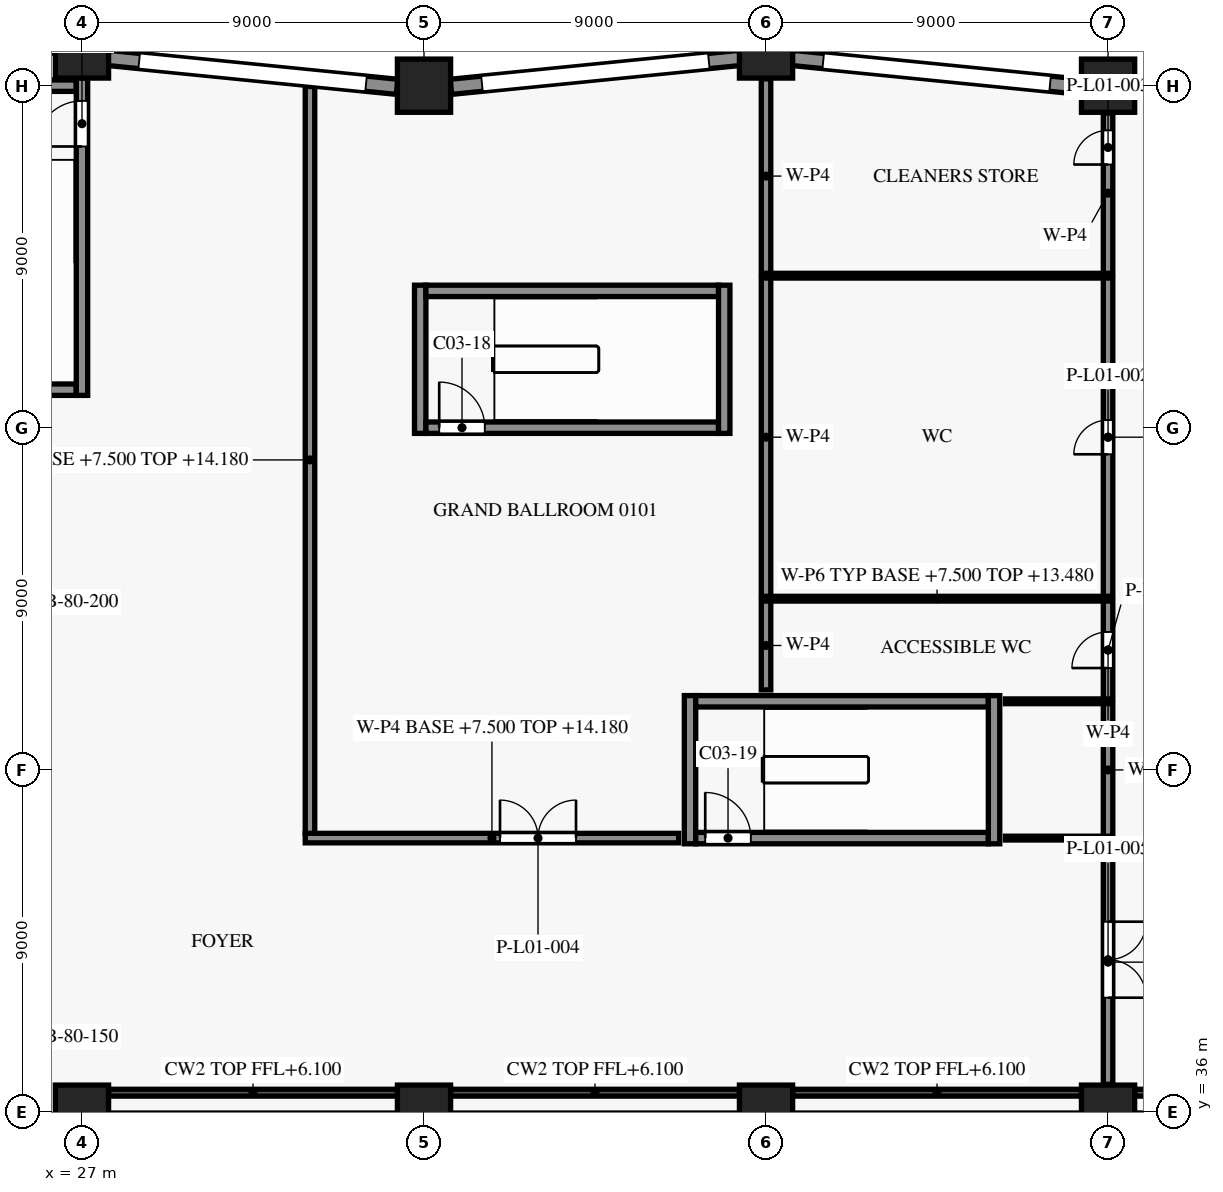
"""IFC4 building model, lengths in metres.
Left out: names, types, materials, properties, quantities, classifications, styles, units other than length and angle.
Written with IfcOpenShell. Run it as: python <this file> out.ifc"""

import sys

from ifc_helpers import new_model, si_unit, direction, frame, frame_2d, origin, origin_2d, place, context, subcontext, project, spatial, rectangle, extrude, element, fill, save


model = new_model("IFC4")
c1 = context("Model", 3, precision=1e-05, world=origin(), true_north=direction((0.0, 1.0)))
c2 = subcontext(c1, "Body", "Model", "MODEL_VIEW")
j1 = project(units=[si_unit("LENGTHUNIT", "METRE"), si_unit("PLANEANGLEUNIT", "RADIAN")], contexts=[c1])
p1 = place(None, origin())
s1 = spatial("IfcSite", under=j1, at=p1, CompositionType="ELEMENT")
p2 = place(p1, origin())
s2 = spatial("IfcBuilding", under=s1, at=p2, CompositionType="ELEMENT")
p3 = place(p2, frame((0.0, 0.0, 7.5)))
s3 = spatial("IfcBuildingStorey", under=s2, at=p3, CompositionType="ELEMENT", Elevation=7.5)
for number, where, z_axis, x_axis in (
    (1, (27.0, 36.0, 0.0), (0.0, 0.0, 1.0), (1.0, 0.0, 0.0)),
    (2, (36.0, 36.0, 0.0), (0.0, 0.0, 1.0), (1.0, 0.0, 0.0)),
    (3, (45.0, 36.0, 0.0), (0.0, 0.0, 1.0), (1.0, 0.0, 0.0)),
    (4, (54.0, 36.0, 0.0), (0.0, 0.0, 1.0), (1.0, 0.0, 0.0)),
    (5, (54.0, 63.0, 0.0), (0.0, 0.0, 1.0), (1.0, 0.0, 0.0)),
    (6, (45.0, 63.9, 0.0), (0.0, 0.0, 1.0), (1.0, 0.0, 0.0)),
    (7, (36.0, 63.0, 0.0), (0.0, 0.0, 1.0), (1.0, 0.0, 0.0)),
    (8, (27.0, 63.9, 0.0), (0.0, 0.0, 1.0), (1.0, 0.0, 0.0)),
):
    element("IfcColumn", number, at=place(p3, frame(where, z_axis=z_axis, x_axis=x_axis)), inside=s3, PredefinedType="COLUMN", context=c2, shape_type="SweptSolid", body=[
        extrude(rectangle(XDim=1.4, YDim=1.4, at=origin_2d()), origin(), (0.0, 0.0, 1.0), 7.0),
    ])
p4 = place(p3, frame((54.707, 62.97, 0.0), z_axis=(0.0, 0.0, 1.0), x_axis=(0.995039719416, 0.099478423711, 0.0)))
e9 = element("IfcWall", 9, at=p4, inside=s3, PredefinedType="SOLIDWALL", context=c2, shape_type="SweptSolid", body=[
    extrude(rectangle(XDim=7.645, YDim=0.4, at=frame_2d((3.822, 0.0))), origin(), (0.0, 0.0, 1.0), 6.1),
])
p5 = place(p4, frame((0.823, 0.0, 0.9)))
e10 = element("IfcOpeningElement", 10, at=p5, cuts=e9, PredefinedType="OPENING", context=c2, shape_type="SweptSolid", body=[
    extrude(rectangle(XDim=6.0, YDim=1.8, at=frame_2d((3.0, 0.9))), frame((0.0, 0.21, 0.0), z_axis=(0.0, -1.0, 0.0), x_axis=(1.0, 0.0, 0.0)), (0.0, 0.0, 1.0), 0.42),
])
p6 = place(p3, frame((45.687, 63.731, 0.0), z_axis=(0.0, 0.0, 1.0), x_axis=(0.995039719416, -0.099478423711, 0.0)))
e11 = element("IfcWall", 11, at=p6, inside=s3, PredefinedType="SOLIDWALL", context=c2, shape_type="SweptSolid", body=[
    extrude(rectangle(XDim=7.645, YDim=0.4, at=frame_2d((3.822, 0.0))), origin(), (0.0, 0.0, 1.0), 6.1),
])
p7 = place(p6, frame((0.823, 0.0, 0.9)))
e12 = element("IfcOpeningElement", 12, at=p7, cuts=e11, PredefinedType="OPENING", context=c2, shape_type="SweptSolid", body=[
    extrude(rectangle(XDim=6.0, YDim=1.8, at=frame_2d((3.0, 0.9))), frame((0.0, 0.21, 0.0), z_axis=(0.0, -1.0, 0.0), x_axis=(1.0, 0.0, 0.0)), (0.0, 0.0, 1.0), 0.42),
])
p8 = place(p3, frame((36.707, 62.97, 0.0), z_axis=(0.0, 0.0, 1.0), x_axis=(0.995039719416, 0.099478423711, 0.0)))
e13 = element("IfcWall", 13, at=p8, inside=s3, PredefinedType="SOLIDWALL", context=c2, shape_type="SweptSolid", body=[
    extrude(rectangle(XDim=7.645, YDim=0.4, at=frame_2d((3.822, 0.0))), origin(), (0.0, 0.0, 1.0), 6.1),
])
p9 = place(p8, frame((0.823, 0.0, 0.9)))
e14 = element("IfcOpeningElement", 14, at=p9, cuts=e13, PredefinedType="OPENING", context=c2, shape_type="SweptSolid", body=[
    extrude(rectangle(XDim=6.0, YDim=1.8, at=frame_2d((3.0, 0.9))), frame((0.0, 0.21, 0.0), z_axis=(0.0, -1.0, 0.0), x_axis=(1.0, 0.0, 0.0)), (0.0, 0.0, 1.0), 0.42),
])
p10 = place(p3, frame((27.687, 63.731, 0.0), z_axis=(0.0, 0.0, 1.0), x_axis=(0.995039719416, -0.099478423711, 0.0)))
e15 = element("IfcWall", 15, at=p10, inside=s3, PredefinedType="SOLIDWALL", context=c2, shape_type="SweptSolid", body=[
    extrude(rectangle(XDim=7.645, YDim=0.4, at=frame_2d((3.822, 0.0))), origin(), (0.0, 0.0, 1.0), 6.1),
])
p11 = place(p10, frame((0.823, 0.0, 0.9)))
e16 = element("IfcOpeningElement", 16, at=p11, cuts=e15, PredefinedType="OPENING", context=c2, shape_type="SweptSolid", body=[
    extrude(rectangle(XDim=6.0, YDim=1.8, at=frame_2d((3.0, 0.9))), frame((0.0, 0.21, 0.0), z_axis=(0.0, -1.0, 0.0), x_axis=(1.0, 0.0, 0.0)), (0.0, 0.0, 1.0), 0.42),
])
p12 = place(p3, frame((43.15, 43.2, 0.0), z_axis=(0.0, 0.0, 1.0), x_axis=(1.0, 0.0, 0.0)))
e17 = element("IfcWall", 17, at=p12, inside=s3, PredefinedType="SHEAR", context=c2, shape_type="SweptSolid", body=[
    extrude(rectangle(XDim=7.7, YDim=0.3, at=frame_2d((3.85, 0.0))), origin(), (0.0, 0.0, 1.0), 6.7),
])
p13 = place(p12, frame((0.25, 0.0, 0.0)))
e18 = element("IfcOpeningElement", 18, at=p13, cuts=e17, PredefinedType="OPENING", context=c2, shape_type="SweptSolid", body=[
    extrude(rectangle(XDim=1.2, YDim=2.2, at=frame_2d((0.6, 1.1))), frame((0.0, 0.16, 0.0), z_axis=(0.0, -1.0, 0.0), x_axis=(1.0, 0.0, 0.0)), (0.0, 0.0, 1.0), 0.32),
])
p14 = place(p3, frame((43.15, 46.8, 0.0), z_axis=(0.0, 0.0, 1.0), x_axis=(1.0, 0.0, 0.0)))
e19 = element("IfcWall", 19, at=p14, inside=s3, PredefinedType="SHEAR", context=c2, shape_type="SweptSolid", body=[
    extrude(rectangle(XDim=7.7, YDim=0.3, at=frame_2d((3.85, 0.0))), origin(), (0.0, 0.0, 1.0), 6.7),
])
p15 = place(p3, frame((36.05, 54.0, 0.0), z_axis=(0.0, 0.0, 1.0), x_axis=(1.0, 0.0, 0.0)))
e20 = element("IfcWall", 20, at=p15, inside=s3, PredefinedType="SHEAR", context=c2, shape_type="SweptSolid", body=[
    extrude(rectangle(XDim=7.7, YDim=0.3, at=frame_2d((3.85, 0.0))), origin(), (0.0, 0.0, 1.0), 6.7),
])
p16 = place(p15, frame((0.35, 0.0, 0.0)))
e21 = element("IfcOpeningElement", 21, at=p16, cuts=e20, PredefinedType="OPENING", context=c2, shape_type="SweptSolid", body=[
    extrude(rectangle(XDim=1.2, YDim=2.2, at=frame_2d((0.6, 1.1))), frame((0.0, 0.16, 0.0), z_axis=(0.0, -1.0, 0.0), x_axis=(1.0, 0.0, 0.0)), (0.0, 0.0, 1.0), 0.32),
])
p17 = place(p3, frame((23.4, 55.0, 0.0), z_axis=(0.0, 0.0, 1.0), x_axis=(1.0, 0.0, 0.0)))
e22 = element("IfcWall", 22, at=p17, inside=s3, PredefinedType="SHEAR", context=c2, shape_type="SweptSolid", body=[
    extrude(rectangle(XDim=3.45, YDim=0.3, at=frame_2d((1.725, 0.0))), origin(), (0.0, 0.0, 1.0), 6.7),
])
p18 = place(p3, frame((36.05, 57.6, 0.0), z_axis=(0.0, 0.0, 1.0), x_axis=(1.0, 0.0, 0.0)))
e23 = element("IfcWall", 23, at=p18, inside=s3, PredefinedType="SHEAR", context=c2, shape_type="SweptSolid", body=[
    extrude(rectangle(XDim=7.7, YDim=0.3, at=frame_2d((3.85, 0.0))), origin(), (0.0, 0.0, 1.0), 6.7),
])
p19 = place(p3, frame((23.55, 63.0, 0.0), z_axis=(0.0, 0.0, 1.0), x_axis=(1.0, 0.0, 0.0)))
e24 = element("IfcWall", 24, at=p19, inside=s3, PredefinedType="SHEAR", context=c2, shape_type="SweptSolid", body=[
    extrude(rectangle(XDim=3.3, YDim=0.3, at=frame_2d((1.65, 0.0))), origin(), (0.0, 0.0, 1.0), 6.7),
])
p20 = place(p3, frame((27.0, 54.85, 0.0), z_axis=(0.0, 0.0, 1.0), x_axis=(0.0, 1.0, 0.0)))
e25 = element("IfcWall", 25, at=p20, inside=s3, PredefinedType="SHEAR", context=c2, shape_type="SweptSolid", body=[
    extrude(rectangle(XDim=8.35, YDim=0.3, at=frame_2d((4.175, 0.0))), origin(), (0.0, 0.0, 1.0), 6.7),
])
p21 = place(p20, frame((6.55, 0.0, 0.0)))
e26 = element("IfcOpeningElement", 26, at=p21, cuts=e25, PredefinedType="OPENING", context=c2, shape_type="SweptSolid", body=[
    extrude(rectangle(XDim=1.2, YDim=2.2, at=frame_2d((0.6, 1.1))), frame((0.0, 0.16, 0.0), z_axis=(0.0, -1.0, 0.0), x_axis=(1.0, 0.0, 0.0)), (0.0, 0.0, 1.0), 0.32),
])
for number, where, z_axis, x_axis in (
    (27, (35.9, 53.85, 0.0), (0.0, 0.0, 1.0), (0.0, 1.0, 0.0)),
    (28, (43.0, 43.05, 0.0), (0.0, 0.0, 1.0), (0.0, 1.0, 0.0)),
    (29, (43.9, 53.85, 0.0), (0.0, 0.0, 1.0), (0.0, 1.0, 0.0)),
    (30, (51.0, 43.05, 0.0), (0.0, 0.0, 1.0), (0.0, 1.0, 0.0)),
):
    element("IfcWall", number, at=place(p3, frame(where, z_axis=z_axis, x_axis=x_axis)), inside=s3, PredefinedType="SHEAR", context=c2, shape_type="SweptSolid", body=[
        extrude(rectangle(XDim=3.9, YDim=0.3, at=frame_2d((1.95, 0.0))), origin(), (0.0, 0.0, 1.0), 6.7),
    ])
p22 = place(p3, frame((54.0, 43.15, 0.0), z_axis=(0.0, 0.0, 1.0), x_axis=(0.0, -1.0, 0.0)))
e31 = element("IfcWall", 31, at=p22, inside=s3, PredefinedType="PARTITIONING", context=c2, shape_type="SweptSolid", body=[
    extrude(rectangle(XDim=6.43, YDim=0.25, at=frame_2d((3.215, 0.0))), origin(), (0.0, 0.0, 1.0), 5.98),
])
p23 = place(p22, frame((2.15, 0.0, 0.0)))
e32 = element("IfcOpeningElement", 32, at=p23, cuts=e31, PredefinedType="OPENING", context=c2, shape_type="SweptSolid", body=[
    extrude(rectangle(XDim=2.0, YDim=2.1, at=frame_2d((1.0, 1.05))), frame((0.0, 0.135, 0.0), z_axis=(0.0, -1.0, 0.0), x_axis=(1.0, 0.0, 0.0)), (0.0, 0.0, 1.0), 0.27),
])
p24 = place(p3, frame((32.875, 43.2, 0.0), z_axis=(0.0, 0.0, 1.0), x_axis=(1.0, 0.0, 0.0)))
e33 = element("IfcWall", 33, at=p24, inside=s3, PredefinedType="PARTITIONING", context=c2, shape_type="SweptSolid", body=[
    extrude(rectangle(XDim=9.825, YDim=0.25, at=frame_2d((4.913, 0.0))), origin(), (0.0, 0.0, 1.0), 6.68),
])
p25 = place(p24, frame((5.125, 0.0, 0.0)))
e34 = element("IfcOpeningElement", 34, at=p25, cuts=e33, PredefinedType="OPENING", context=c2, shape_type="SweptSolid", body=[
    extrude(rectangle(XDim=2.0, YDim=2.1, at=frame_2d((1.0, 1.05))), frame((0.0, 0.135, 0.0), z_axis=(0.0, -1.0, 0.0), x_axis=(1.0, 0.0, 0.0)), (0.0, 0.0, 1.0), 0.27),
])
p26 = place(p3, frame((51.3, 43.2, 0.0), z_axis=(0.0, 0.0, 1.0), x_axis=(1.0, 0.0, 0.0)))
e35 = element("IfcWall", 35, at=p26, inside=s3, PredefinedType="PARTITIONING", context=c2, shape_type="SweptSolid", body=[
    extrude(rectangle(XDim=2.575, YDim=0.1, at=frame_2d((1.288, 0.0))), origin(), (0.0, 0.0, 1.0), 5.98),
])
p27 = place(p3, frame((54.0, 43.25, 0.0), z_axis=(0.0, 0.0, 1.0), x_axis=(0.0, 1.0, 0.0)))
e36 = element("IfcWall", 36, at=p27, inside=s3, PredefinedType="PARTITIONING", context=c2, shape_type="SweptSolid", body=[
    extrude(rectangle(XDim=3.488, YDim=0.25, at=frame_2d((1.744, 0.0))), origin(), (0.0, 0.0, 1.0), 5.98),
])
p28 = place(p3, frame((53.875, 46.8, 0.0), z_axis=(0.0, 0.0, 1.0), x_axis=(-1.0, 0.0, 0.0)))
e37 = element("IfcWall", 37, at=p28, inside=s3, PredefinedType="PARTITIONING", context=c2, shape_type="SweptSolid", body=[
    extrude(rectangle(XDim=2.575, YDim=0.125, at=frame_2d((1.288, 0.0))), origin(), (0.0, 0.0, 1.0), 5.98),
])
p29 = place(p3, frame((54.0, 46.863, 0.0), z_axis=(0.0, 0.0, 1.0), x_axis=(0.0, 1.0, 0.0)))
e38 = element("IfcWall", 38, at=p29, inside=s3, PredefinedType="PARTITIONING", context=c2, shape_type="SweptSolid", body=[
    extrude(rectangle(XDim=2.575, YDim=0.25, at=frame_2d((1.288, 0.0))), origin(), (0.0, 0.0, 1.0), 5.98),
])
p30 = place(p29, frame((0.812, 0.0, 0.0)))
e39 = element("IfcOpeningElement", 39, at=p30, cuts=e38, PredefinedType="OPENING", context=c2, shape_type="SweptSolid", body=[
    extrude(rectangle(XDim=0.95, YDim=2.1, at=frame_2d((0.475, 1.05))), frame((0.0, 0.135, 0.0), z_axis=(0.0, -1.0, 0.0), x_axis=(1.0, 0.0, 0.0)), (0.0, 0.0, 1.0), 0.27),
])
p31 = place(p3, frame((45.0, 49.438, 0.0), z_axis=(0.0, 0.0, 1.0), x_axis=(0.0, -1.0, 0.0)))
e40 = element("IfcWall", 40, at=p31, inside=s3, PredefinedType="PARTITIONING", context=c2, shape_type="SweptSolid", body=[
    extrude(rectangle(XDim=2.337, YDim=0.25, at=frame_2d((1.169, 0.0))), origin(), (0.0, 0.0, 1.0), 5.98),
])
p32 = place(p3, frame((45.125, 49.5, 0.0), z_axis=(0.0, 0.0, 1.0), x_axis=(1.0, 0.0, 0.0)))
e41 = element("IfcWall", 41, at=p32, inside=s3, PredefinedType="PARTITIONING", context=c2, shape_type="SweptSolid", body=[
    extrude(rectangle(XDim=8.75, YDim=0.125, at=frame_2d((4.375, 0.0))), origin(), (0.0, 0.0, 1.0), 5.98),
])
p33 = place(p3, frame((54.0, 49.562, 0.0), z_axis=(0.0, 0.0, 1.0), x_axis=(0.0, 1.0, 0.0)))
e42 = element("IfcWall", 42, at=p33, inside=s3, PredefinedType="PARTITIONING", context=c2, shape_type="SweptSolid", body=[
    extrude(rectangle(XDim=8.375, YDim=0.25, at=frame_2d((4.188, 0.0))), origin(), (0.0, 0.0, 1.0), 5.98),
])
p34 = place(p33, frame((3.738, 0.0, 0.0)))
e43 = element("IfcOpeningElement", 43, at=p34, cuts=e42, PredefinedType="OPENING", context=c2, shape_type="SweptSolid", body=[
    extrude(rectangle(XDim=0.9, YDim=2.1, at=frame_2d((0.45, 1.05))), frame((0.0, 0.135, 0.0), z_axis=(0.0, -1.0, 0.0), x_axis=(1.0, 0.0, 0.0)), (0.0, 0.0, 1.0), 0.27),
])
p35 = place(p3, frame((45.0, 57.938, 0.0), z_axis=(0.0, 0.0, 1.0), x_axis=(0.0, -1.0, 0.0)))
e44 = element("IfcWall", 44, at=p35, inside=s3, PredefinedType="PARTITIONING", context=c2, shape_type="SweptSolid", body=[
    extrude(rectangle(XDim=8.375, YDim=0.25, at=frame_2d((4.188, 0.0))), origin(), (0.0, 0.0, 1.0), 5.98),
])
p36 = place(p3, frame((45.125, 58.0, 0.0), z_axis=(0.0, 0.0, 1.0), x_axis=(1.0, 0.0, 0.0)))
e45 = element("IfcWall", 45, at=p36, inside=s3, PredefinedType="PARTITIONING", context=c2, shape_type="SweptSolid", body=[
    extrude(rectangle(XDim=8.75, YDim=0.125, at=frame_2d((4.375, 0.0))), origin(), (0.0, 0.0, 1.0), 5.98),
])
p37 = place(p3, frame((54.0, 58.062, 0.0), z_axis=(0.0, 0.0, 1.0), x_axis=(0.0, 1.0, 0.0)))
e46 = element("IfcWall", 46, at=p37, inside=s3, PredefinedType="PARTITIONING", context=c2, shape_type="SweptSolid", body=[
    extrude(rectangle(XDim=4.218, YDim=0.25, at=frame_2d((2.109, 0.0))), origin(), (0.0, 0.0, 1.0), 5.98),
])
p38 = place(p37, frame((2.863, 0.0, 0.0)))
e47 = element("IfcOpeningElement", 47, at=p38, cuts=e46, PredefinedType="OPENING", context=c2, shape_type="SweptSolid", body=[
    extrude(rectangle(XDim=0.9, YDim=2.1, at=frame_2d((0.45, 1.05))), frame((0.0, 0.135, 0.0), z_axis=(0.0, -1.0, 0.0), x_axis=(1.0, 0.0, 0.0)), (0.0, 0.0, 1.0), 0.27),
])
p39 = place(p3, frame((33.0, 62.979, 0.0), z_axis=(0.0, 0.0, 1.0), x_axis=(0.0, -1.0, 0.0)))
e48 = element("IfcWall", 48, at=p39, inside=s3, PredefinedType="PARTITIONING", context=c2, shape_type="SweptSolid", body=[
    extrude(rectangle(XDim=19.654, YDim=0.25, at=frame_2d((9.827, 0.0))), origin(), (0.0, 0.0, 1.0), 6.68),
])
p40 = place(p3, frame((45.0, 63.18, 0.0), z_axis=(0.0, 0.0, 1.0), x_axis=(0.0, -1.0, 0.0)))
e49 = element("IfcWall", 49, at=p40, inside=s3, PredefinedType="PARTITIONING", context=c2, shape_type="SweptSolid", body=[
    extrude(rectangle(XDim=5.117, YDim=0.25, at=frame_2d((2.559, 0.0))), origin(), (0.0, 0.0, 1.0), 5.98),
])
p41 = place(p7, origin())
e50 = element("IfcWindow", 50, at=p41, inside=s3, PartitioningType="SINGLE_PANEL", PredefinedType="WINDOW", context=c2, shape_type="SweptSolid", body=[
    extrude(rectangle(XDim=6.0, YDim=1.8, at=frame_2d((3.0, 0.9))), frame((0.0, 0.03, 0.0), z_axis=(0.0, -1.0, 0.0), x_axis=(1.0, 0.0, 0.0)), (0.0, 0.0, 1.0), 0.06),
])
fill(e12, e50)
p42 = place(p9, origin())
e51 = element("IfcWindow", 51, at=p42, inside=s3, PartitioningType="SINGLE_PANEL", PredefinedType="WINDOW", context=c2, shape_type="SweptSolid", body=[
    extrude(rectangle(XDim=6.0, YDim=1.8, at=frame_2d((3.0, 0.9))), frame((0.0, 0.03, 0.0), z_axis=(0.0, -1.0, 0.0), x_axis=(1.0, 0.0, 0.0)), (0.0, 0.0, 1.0), 0.06),
])
fill(e14, e51)
p43 = place(p11, origin())
e52 = element("IfcWindow", 52, at=p43, inside=s3, PartitioningType="SINGLE_PANEL", PredefinedType="WINDOW", context=c2, shape_type="SweptSolid", body=[
    extrude(rectangle(XDim=6.0, YDim=1.8, at=frame_2d((3.0, 0.9))), frame((0.0, 0.03, 0.0), z_axis=(0.0, -1.0, 0.0), x_axis=(1.0, 0.0, 0.0)), (0.0, 0.0, 1.0), 0.06),
])
fill(e16, e52)
p44 = place(p21, origin())
e53 = element("IfcDoor", 53, at=p44, inside=s3, OperationType="SINGLE_SWING_LEFT", PredefinedType="DOOR", context=c2, shape_type="SweptSolid", body=[
    extrude(rectangle(XDim=1.2, YDim=2.2, at=frame_2d((0.6, 1.1))), frame((0.0, 0.025, 0.0), z_axis=(0.0, -1.0, 0.0), x_axis=(1.0, 0.0, 0.0)), (0.0, 0.0, 1.0), 0.05),
])
fill(e26, e53)
p45 = place(p16, origin())
e54 = element("IfcDoor", 54, at=p45, inside=s3, OperationType="SINGLE_SWING_LEFT", PredefinedType="DOOR", context=c2, shape_type="SweptSolid", body=[
    extrude(rectangle(XDim=1.2, YDim=2.2, at=frame_2d((0.6, 1.1))), frame((0.0, 0.025, 0.0), z_axis=(0.0, -1.0, 0.0), x_axis=(1.0, 0.0, 0.0)), (0.0, 0.0, 1.0), 0.05),
])
fill(e21, e54)
p46 = place(p13, origin())
e55 = element("IfcDoor", 55, at=p46, inside=s3, OperationType="SINGLE_SWING_RIGHT", PredefinedType="DOOR", context=c2, shape_type="SweptSolid", body=[
    extrude(rectangle(XDim=1.2, YDim=2.2, at=frame_2d((0.6, 1.1))), frame((0.0, 0.025, 0.0), z_axis=(0.0, -1.0, 0.0), x_axis=(1.0, 0.0, 0.0)), (0.0, 0.0, 1.0), 0.05),
])
fill(e18, e55)
p47 = place(p30, origin())
e56 = element("IfcDoor", 56, at=p47, inside=s3, OperationType="SINGLE_SWING_RIGHT", PredefinedType="DOOR", context=c2, shape_type="SweptSolid", body=[
    extrude(rectangle(XDim=0.95, YDim=2.1, at=frame_2d((0.475, 1.05))), frame((0.0, 0.025, 0.0), z_axis=(0.0, -1.0, 0.0), x_axis=(1.0, 0.0, 0.0)), (0.0, 0.0, 1.0), 0.05),
])
fill(e39, e56)
p48 = place(p34, origin())
e57 = element("IfcDoor", 57, at=p48, inside=s3, OperationType="SINGLE_SWING_RIGHT", PredefinedType="DOOR", context=c2, shape_type="SweptSolid", body=[
    extrude(rectangle(XDim=0.9, YDim=2.1, at=frame_2d((0.45, 1.05))), frame((0.0, 0.025, 0.0), z_axis=(0.0, -1.0, 0.0), x_axis=(1.0, 0.0, 0.0)), (0.0, 0.0, 1.0), 0.05),
])
fill(e43, e57)
p49 = place(p38, origin())
e58 = element("IfcDoor", 58, at=p49, inside=s3, OperationType="SINGLE_SWING_RIGHT", PredefinedType="DOOR", context=c2, shape_type="SweptSolid", body=[
    extrude(rectangle(XDim=0.9, YDim=2.1, at=frame_2d((0.45, 1.05))), frame((0.0, 0.025, 0.0), z_axis=(0.0, -1.0, 0.0), x_axis=(1.0, 0.0, 0.0)), (0.0, 0.0, 1.0), 0.05),
])
fill(e47, e58)
p50 = place(p25, origin())
e59 = element("IfcDoor", 59, at=p50, inside=s3, OperationType="DOUBLE_DOOR_SINGLE_SWING", PredefinedType="DOOR", context=c2, shape_type="SweptSolid", body=[
    extrude(rectangle(XDim=2.0, YDim=2.1, at=frame_2d((1.0, 1.05))), frame((0.0, 0.025, 0.0), z_axis=(0.0, -1.0, 0.0), x_axis=(1.0, 0.0, 0.0)), (0.0, 0.0, 1.0), 0.05),
])
fill(e34, e59)
p51 = place(p23, origin())
e60 = element("IfcDoor", 60, at=p51, inside=s3, OperationType="DOUBLE_DOOR_SINGLE_SWING", PredefinedType="DOOR", context=c2, shape_type="SweptSolid", body=[
    extrude(rectangle(XDim=2.0, YDim=2.1, at=frame_2d((1.0, 1.05))), frame((0.0, 0.025, 0.0), z_axis=(0.0, -1.0, 0.0), x_axis=(1.0, 0.0, 0.0)), (0.0, 0.0, 1.0), 0.05),
])
fill(e32, e60)
save(model, sys.argv[1])
